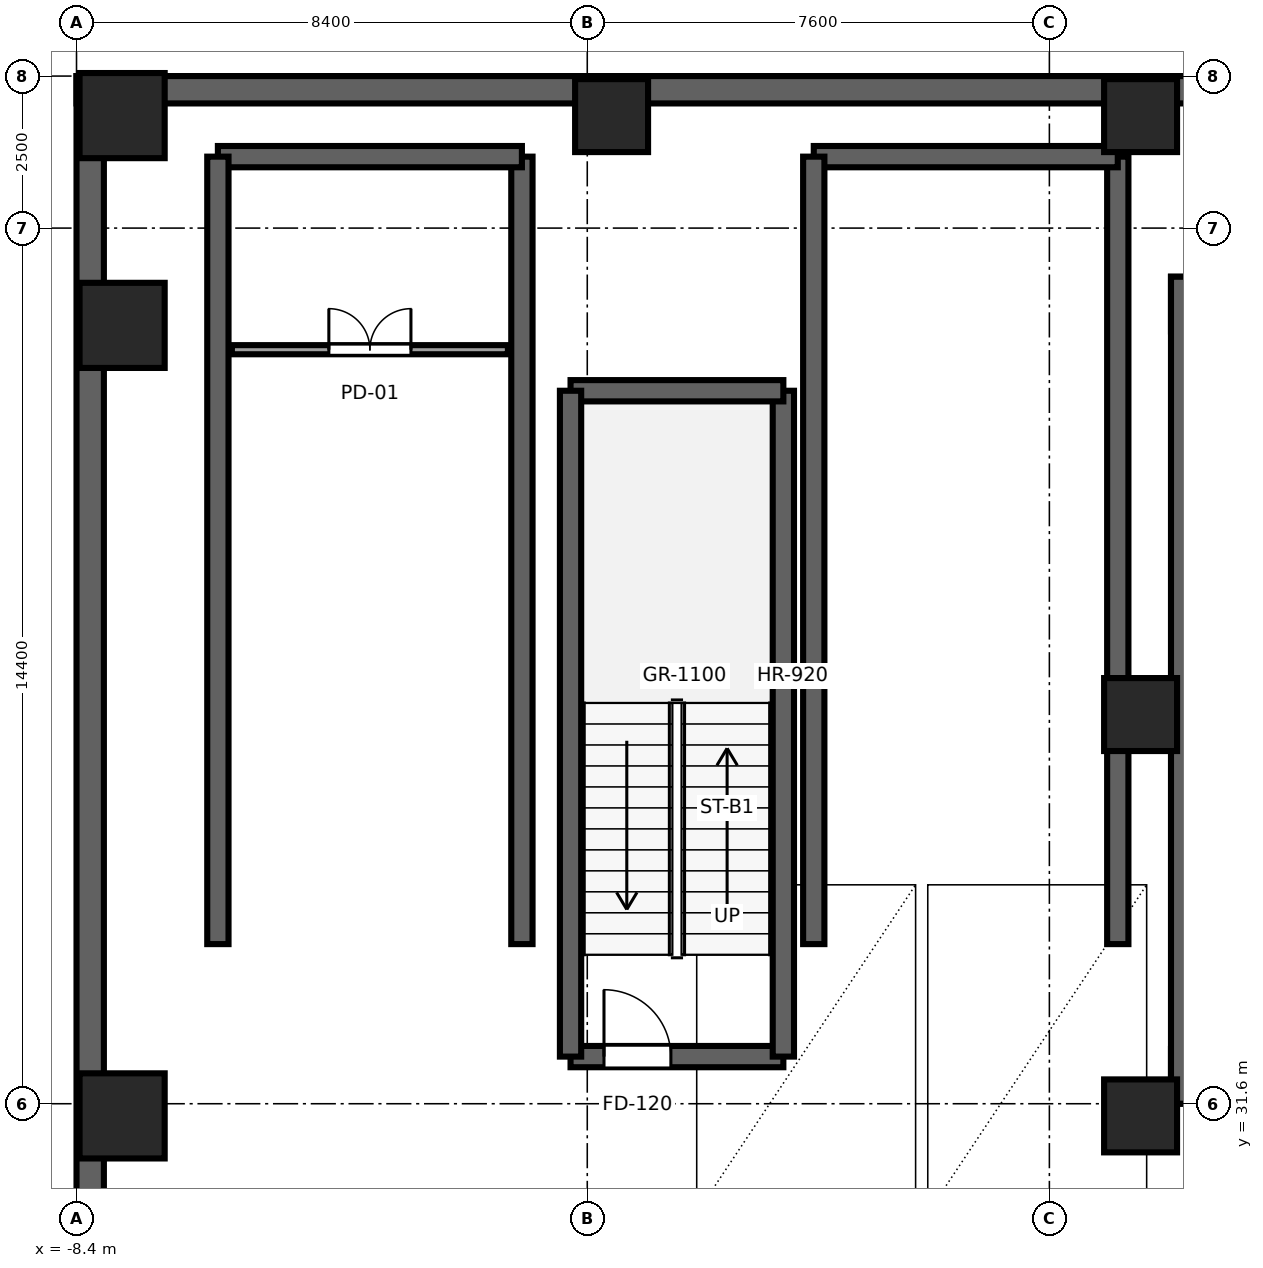
"""IFC4 building model, lengths in metres.
Left out: names, types, materials, properties, quantities, classifications, styles, units other than length and angle.
Written with IfcOpenShell. Run it as: python <this file> out.ifc"""

import sys

from ifc_helpers import new_model, si_unit, direction, frame, frame_2d, origin, origin_2d, place, context, subcontext, project, spatial, rectangle, extrude, source, transform, mapped, element, fill, save


model = new_model("IFC4")
c1 = context("Model", 3, precision=1e-05, world=origin(), true_north=direction((0.0, 1.0)))
c2 = subcontext(c1, "Body", "Model", "MODEL_VIEW")
j1 = project(units=[si_unit("LENGTHUNIT", "METRE"), si_unit("PLANEANGLEUNIT", "RADIAN")], contexts=[c1])
p1 = place(None, origin())
s1 = spatial("IfcSite", under=j1, at=p1, CompositionType="ELEMENT")
p2 = place(p1, origin())
s2 = spatial("IfcBuilding", under=s1, at=p2, CompositionType="ELEMENT")
p3 = place(p2, frame((0.0, 0.0, -14.4)))
s3 = spatial("IfcBuildingStorey", under=s2, at=p3, CompositionType="ELEMENT", Elevation=-14.4)
p4 = place(p3, frame((9.6, 32.05, 0.0), z_axis=(0.0, 0.0, 1.0), x_axis=(1.0, 0.0, 0.0)))
e1 = element("IfcWall", 1, at=p4, inside=s3, PredefinedType="SHEAR", context=c2, shape_type="SweptSolid", body=[
    extrude(rectangle(XDim=26.8, YDim=0.9, at=frame_2d((13.4, 0.0))), origin(), (0.0, 0.0, 1.0), 4.8),
])
p5 = place(p4, frame((7.85, 0.0, 0.0), z_axis=(0.0, 0.0, 1.0), x_axis=(-1.0, 0.0, 0.0)))
e2 = element("IfcOpeningElement", 2, at=p5, cuts=e1, PredefinedType="OPENING", context=c2, shape_type="SweptSolid", body=[
    extrude(rectangle(XDim=1.5, YDim=2.04, at=frame_2d((0.75, 1.02))), frame((0.0, 0.46, 0.0), z_axis=(0.0, -1.0, 0.0), x_axis=(1.0, 0.0, 0.0)), (0.0, 0.0, 1.0), 0.92),
])
p6 = place(p4, frame((14.15, 0.0, 0.0), z_axis=(0.0, 0.0, 1.0), x_axis=(-1.0, 0.0, 0.0)))
e3 = element("IfcOpeningElement", 3, at=p6, cuts=e1, PredefinedType="OPENING", context=c2, shape_type="SweptSolid", body=[
    extrude(rectangle(XDim=1.5, YDim=2.04, at=frame_2d((0.75, 1.02))), frame((0.0, 0.46, 0.0), z_axis=(0.0, -1.0, 0.0), x_axis=(1.0, 0.0, 0.0)), (0.0, 0.0, 1.0), 0.92),
])
p7 = place(p4, frame((21.25, 0.0, 0.0), z_axis=(0.0, 0.0, 1.0), x_axis=(-1.0, 0.0, 0.0)))
e4 = element("IfcOpeningElement", 4, at=p7, cuts=e1, PredefinedType="OPENING", context=c2, shape_type="SweptSolid", body=[
    extrude(rectangle(XDim=1.5, YDim=2.04, at=frame_2d((0.75, 1.02))), frame((0.0, 0.46, 0.0), z_axis=(0.0, -1.0, 0.0), x_axis=(1.0, 0.0, 0.0)), (0.0, 0.0, 1.0), 0.92),
])
p8 = place(p3, frame((9.6, 44.75, 0.0), z_axis=(0.0, 0.0, 1.0), x_axis=(1.0, 0.0, 0.0)))
e5 = element("IfcWall", 5, at=p8, inside=s3, PredefinedType="SHEAR", context=c2, shape_type="SweptSolid", body=[
    extrude(rectangle(XDim=26.8, YDim=0.9, at=frame_2d((13.4, 0.0))), origin(), (0.0, 0.0, 1.0), 4.8),
])
p9 = place(p3, frame((10.05, 31.6, 0.0), z_axis=(0.0, 0.0, 1.0), x_axis=(0.0, 1.0, 0.0)))
e6 = element("IfcWall", 6, at=p9, inside=s3, PredefinedType="SHEAR", context=c2, shape_type="SweptSolid", body=[
    extrude(rectangle(XDim=13.6, YDim=0.9, at=frame_2d((6.8, 0.0))), origin(), (0.0, 0.0, 1.0), 4.8),
])
p10 = place(p3, frame((-0.275, 32.375, 0.0), z_axis=(0.0, 0.0, 1.0), x_axis=(1.0, 0.0, 0.0)))
e7 = element("IfcWall", 7, at=p10, inside=s3, PredefinedType="SHEAR", context=c2, shape_type="SweptSolid", body=[
    extrude(rectangle(XDim=3.5, YDim=0.35, at=frame_2d((1.75, 0.0))), origin(), (0.0, 0.0, 1.0), 4.8),
])
p11 = place(p10, frame((0.55, 0.0, 0.0)))
e8 = element("IfcOpeningElement", 8, at=p11, cuts=e7, PredefinedType="OPENING", context=c2, shape_type="SweptSolid", body=[
    extrude(rectangle(XDim=1.1, YDim=2.12, at=frame_2d((0.55, 1.06))), frame((0.0, 0.185, 0.0), z_axis=(0.0, -1.0, 0.0), x_axis=(1.0, 0.0, 0.0)), (0.0, 0.0, 1.0), 0.37),
])
p12 = place(p3, frame((3.225, 32.375, 0.0), z_axis=(0.0, 0.0, 1.0), x_axis=(0.0, 1.0, 0.0)))
e9 = element("IfcWall", 9, at=p12, inside=s3, PredefinedType="SHEAR", context=c2, shape_type="SweptSolid", body=[
    extrude(rectangle(XDim=10.95, YDim=0.35, at=frame_2d((5.475, 0.0))), origin(), (0.0, 0.0, 1.0), 4.8),
])
p13 = place(p3, frame((3.225, 43.325, 0.0), z_axis=(0.0, 0.0, 1.0), x_axis=(-1.0, 0.0, 0.0)))
e10 = element("IfcWall", 10, at=p13, inside=s3, PredefinedType="SHEAR", context=c2, shape_type="SweptSolid", body=[
    extrude(rectangle(XDim=3.5, YDim=0.35, at=frame_2d((1.75, 0.0))), origin(), (0.0, 0.0, 1.0), 4.8),
])
p14 = place(p3, frame((-0.275, 43.325, 0.0), z_axis=(0.0, 0.0, 1.0), x_axis=(0.0, -1.0, 0.0)))
e11 = element("IfcWall", 11, at=p14, inside=s3, PredefinedType="SHEAR", context=c2, shape_type="SweptSolid", body=[
    extrude(rectangle(XDim=10.95, YDim=0.35, at=frame_2d((5.475, 0.0))), origin(), (0.0, 0.0, 1.0), 4.8),
])
p15 = place(p3, frame((-1.075, 34.225, 0.0), z_axis=(0.0, 0.0, 1.0), x_axis=(0.0, 1.0, 0.0)))
e12 = element("IfcWall", 12, at=p15, inside=s3, PredefinedType="SHEAR", context=c2, shape_type="SweptSolid", body=[
    extrude(rectangle(XDim=12.95, YDim=0.35, at=frame_2d((6.475, 0.0))), origin(), (0.0, 0.0, 1.0), 4.8),
])
p16 = place(p3, frame((-1.075, 47.175, 0.0), z_axis=(0.0, 0.0, 1.0), x_axis=(-1.0, 0.0, 0.0)))
e13 = element("IfcWall", 13, at=p16, inside=s3, PredefinedType="SHEAR", context=c2, shape_type="SweptSolid", body=[
    extrude(rectangle(XDim=5.0, YDim=0.35, at=frame_2d((2.5, 0.0))), origin(), (0.0, 0.0, 1.0), 4.8),
])
for number, where, z_axis, x_axis in (
    (14, (-6.075, 47.175, 0.0), (0.0, 0.0, 1.0), (0.0, -1.0, 0.0)),
    (15, (8.725, 34.225, 0.0), (0.0, 0.0, 1.0), (0.0, 1.0, 0.0)),
):
    element("IfcWall", number, at=place(p3, frame(where, z_axis=z_axis, x_axis=x_axis)), inside=s3, PredefinedType="SHEAR", context=c2, shape_type="SweptSolid", body=[
        extrude(rectangle(XDim=12.95, YDim=0.35, at=frame_2d((6.475, 0.0))), origin(), (0.0, 0.0, 1.0), 4.8),
    ])
p17 = place(p3, frame((8.725, 47.175, 0.0), z_axis=(0.0, 0.0, 1.0), x_axis=(-1.0, 0.0, 0.0)))
e16 = element("IfcWall", 16, at=p17, inside=s3, PredefinedType="SHEAR", context=c2, shape_type="SweptSolid", body=[
    extrude(rectangle(XDim=5.0, YDim=0.35, at=frame_2d((2.5, 0.0))), origin(), (0.0, 0.0, 1.0), 4.8),
])
p18 = place(p3, frame((3.725, 47.175, 0.0), z_axis=(0.0, 0.0, 1.0), x_axis=(0.0, -1.0, 0.0)))
e17 = element("IfcWall", 17, at=p18, inside=s3, PredefinedType="SHEAR", context=c2, shape_type="SweptSolid", body=[
    extrude(rectangle(XDim=12.95, YDim=0.35, at=frame_2d((6.475, 0.0))), origin(), (0.0, 0.0, 1.0), 4.8),
])
p19 = place(p3, frame((-8.4, 48.275, 0.0), z_axis=(0.0, 0.0, 1.0), x_axis=(1.0, 0.0, 0.0)))
e18 = element("IfcWall", 18, at=p19, inside=s3, PredefinedType="SOLIDWALL", context=c2, shape_type="SweptSolid", body=[
    extrude(rectangle(XDim=73.8, YDim=0.45, at=frame_2d((36.9, 0.0))), origin(), (0.0, 0.0, 1.0), 4.8),
])
p20 = place(p3, frame((-8.175, -2.5, 0.0), z_axis=(0.0, 0.0, 1.0), x_axis=(0.0, 1.0, 0.0)))
e19 = element("IfcWall", 19, at=p20, inside=s3, PredefinedType="SOLIDWALL", context=c2, shape_type="SweptSolid", body=[
    extrude(rectangle(XDim=51.0, YDim=0.45, at=frame_2d((25.5, 0.0))), origin(), (0.0, 0.0, 1.0), 4.8),
])
m1 = source(origin(), c2, "Body", "SweptSolid", [
    extrude(rectangle(XDim=1.4, YDim=1.4, at=origin_2d()), origin(), (0.0, 0.0, 1.0), 5.2),
])
for number, where, z_axis, x_axis in (
    (20, (-7.65, 31.4, -0.4), (0.0, 0.0, 1.0), (1.0, 0.0, 0.0)),
    (21, (-7.65, 44.4, -0.4), (0.0, 0.0, 1.0), (1.0, 0.0, 0.0)),
    (22, (-7.65, 47.85, -0.4), (0.0, 0.0, 1.0), (1.0, 0.0, 0.0)),
):
    element("IfcColumn", number, at=place(p3, frame(where, z_axis=z_axis, x_axis=x_axis)), inside=s3, PredefinedType="COLUMN", context=c2, shape_type="MappedRepresentation", body=[
        mapped(m1, transform((0.0, 0.0, 0.0), x_axis=(1.0, 0.0, 0.0), y_axis=(0.0, 1.0, 0.0), z_axis=(0.0, 0.0, 1.0), scale=1.0)),
    ])
m2 = source(origin(), c2, "Body", "SweptSolid", [
    extrude(rectangle(XDim=1.2, YDim=1.2, at=origin_2d()), origin(), (0.0, 0.0, 1.0), 5.2),
])
for number, where, z_axis, x_axis in (
    (23, (0.4, 47.85, -0.4), (0.0, 0.0, 1.0), (1.0, 0.0, 0.0)),
    (24, (9.1, 47.85, -0.4), (0.0, 0.0, 1.0), (1.0, 0.0, 0.0)),
    (25, (9.1, 38.0, -0.4), (0.0, 0.0, 1.0), (1.0, 0.0, 0.0)),
    (26, (9.1, 31.4, -0.4), (0.0, 0.0, 1.0), (1.0, 0.0, 0.0)),
):
    element("IfcColumn", number, at=place(p3, frame(where, z_axis=z_axis, x_axis=x_axis)), inside=s3, PredefinedType="COLUMN", context=c2, shape_type="MappedRepresentation", body=[
        mapped(m2, transform((0.0, 0.0, 0.0), x_axis=(1.0, 0.0, 0.0), y_axis=(0.0, 1.0, 0.0), z_axis=(0.0, 0.0, 1.0), scale=1.0)),
    ])
p21 = place(p3, frame((-5.845, 44.0, 0.0), z_axis=(0.0, 0.0, 1.0), x_axis=(1.0, 0.0, 0.0)))
e27 = element("IfcWall", 27, at=p21, inside=s3, PredefinedType="PARTITIONING", context=c2, shape_type="SweptSolid", body=[
    extrude(rectangle(XDim=4.54, YDim=0.15, at=frame_2d((2.27, 0.0))), origin(), (0.0, 0.0, 1.0), 4.54),
])
p22 = place(p21, frame((1.595, 0.0, 0.0)))
e28 = element("IfcOpeningElement", 28, at=p22, cuts=e27, PredefinedType="OPENING", context=c2, shape_type="SweptSolid", body=[
    extrude(rectangle(XDim=1.35, YDim=2.15, at=frame_2d((0.675, 1.075))), frame((0.0, 0.085, 0.0), z_axis=(0.0, -1.0, 0.0), x_axis=(1.0, 0.0, 0.0)), (0.0, 0.0, 1.0), 0.17),
])
m3 = source(origin(), c2, "Body", "SweptSolid", [
    extrude(rectangle(XDim=1.1, YDim=2.12, at=frame_2d((0.55, 1.06))), frame((0.0, 0.025, 0.0), z_axis=(0.0, -1.0, 0.0), x_axis=(1.0, 0.0, 0.0)), (0.0, 0.0, 1.0), 0.05),
])
p23 = place(p11, origin())
e29 = element("IfcDoor", 29, at=p23, inside=s3, OperationType="SINGLE_SWING_LEFT", PredefinedType="DOOR", context=c2, shape_type="MappedRepresentation", body=[
    mapped(m3, transform((0.0, 0.0, 0.0), x_axis=(1.0, 0.0, 0.0), y_axis=(0.0, 1.0, 0.0), z_axis=(0.0, 0.0, 1.0), scale=1.0)),
])
fill(e8, e29)
m4 = source(origin(), c2, "Body", "SweptSolid", [
    extrude(rectangle(XDim=1.35, YDim=2.15, at=frame_2d((0.675, 1.075))), frame((0.0, 0.025, 0.0), z_axis=(0.0, -1.0, 0.0), x_axis=(1.0, 0.0, 0.0)), (0.0, 0.0, 1.0), 0.05),
])
p24 = place(p22, origin())
e30 = element("IfcDoor", 30, at=p24, inside=s3, OperationType="DOUBLE_DOOR_SINGLE_SWING", PredefinedType="DOOR", context=c2, shape_type="MappedRepresentation", body=[
    mapped(m4, transform((0.0, 0.0, 0.0), x_axis=(1.0, 0.0, 0.0), y_axis=(0.0, 1.0, 0.0), z_axis=(0.0, 0.0, 1.0), scale=1.0)),
])
fill(e28, e30)
save(model, sys.argv[1])
